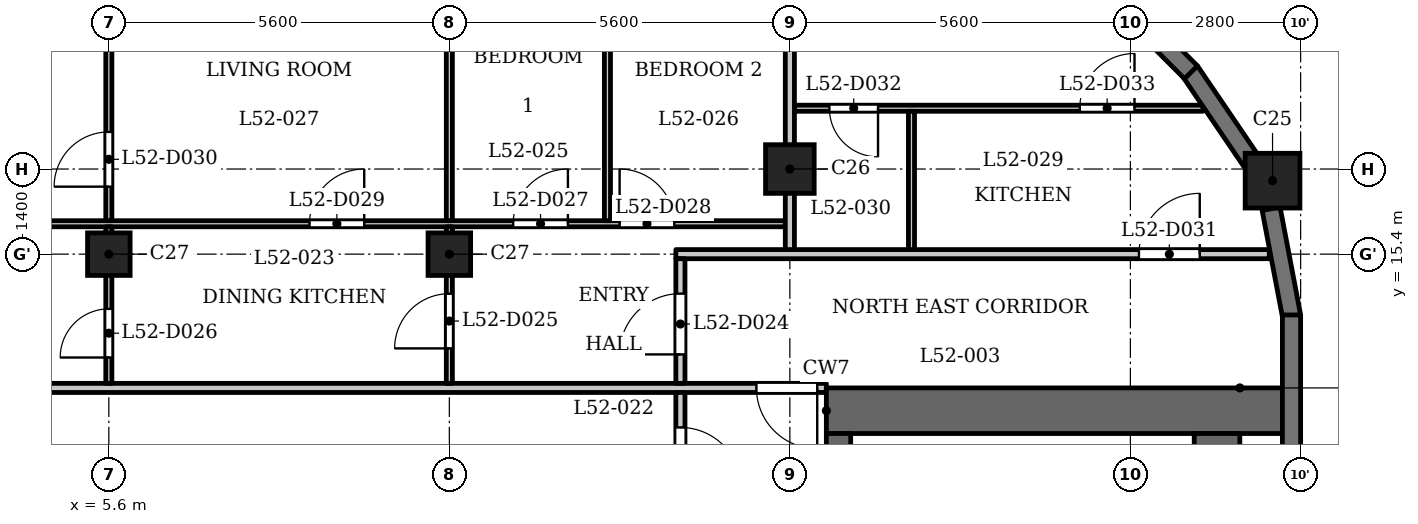
"""IFC4 building model, lengths in metres.
Left out: names, types, materials, properties, quantities, classifications, styles, units other than length and angle.
Written with IfcOpenShell. Run it as: python <this file> out.ifc"""

import sys

from ifc_helpers import new_model, si_unit, direction, frame, frame_2d, origin, origin_2d, place, context, subcontext, project, spatial, rectangle, extrude, element, fill, save


model = new_model("IFC4")
c1 = context("Model", 3, precision=1e-05, world=origin(), true_north=direction((0.0, 1.0)))
c2 = subcontext(c1, "Body", "Model", "MODEL_VIEW")
j1 = project(units=[si_unit("LENGTHUNIT", "METRE"), si_unit("PLANEANGLEUNIT", "RADIAN")], contexts=[c1])
p1 = place(None, origin())
s1 = spatial("IfcSite", under=j1, at=p1, CompositionType="ELEMENT")
p2 = place(p1, origin())
s2 = spatial("IfcBuilding", under=s1, at=p2, CompositionType="ELEMENT")
p3 = place(p2, frame((0.0, 0.0, 202.9)))
s3 = spatial("IfcBuildingStorey", under=s2, at=p3, CompositionType="ELEMENT", Elevation=202.9)
p4 = place(p3, frame((24.738, 16.609, 0.0), z_axis=(0.0, 0.0, 1.0), x_axis=(1.0, 0.0, 0.0)))
e1 = element("IfcColumn", 1, at=p4, inside=s3, PredefinedType="COLUMN", context=c2, shape_type="SweptSolid", body=[
    extrude(rectangle(XDim=0.9, YDim=0.9, at=origin_2d()), origin(), (0.0, 0.0, 1.0), 3.5),
])
p5 = place(p3, frame((16.8, 16.8, 0.0), z_axis=(0.0, 0.0, 1.0), x_axis=(1.0, 0.0, 0.0)))
e2 = element("IfcColumn", 2, at=p5, inside=s3, PredefinedType="COLUMN", context=c2, shape_type="SweptSolid", body=[
    extrude(rectangle(XDim=0.8, YDim=0.8, at=origin_2d()), origin(), (0.0, 0.0, 1.0), 3.5),
])
for number, where, z_axis, x_axis in (
    (3, (5.6, 15.4, 0.0), (0.0, 0.0, 1.0), (1.0, 0.0, 0.0)),
    (4, (11.2, 15.4, 0.0), (0.0, 0.0, 1.0), (1.0, 0.0, 0.0)),
):
    element("IfcColumn", number, at=place(p3, frame(where, z_axis=z_axis, x_axis=x_axis)), inside=s3, PredefinedType="COLUMN", context=c2, shape_type="SweptSolid", body=[
        extrude(rectangle(XDim=0.7, YDim=0.7, at=origin_2d()), origin(), (0.0, 0.0, 1.0), 3.5),
    ])
p6 = place(p3, frame((25.05, 11.65, 0.0), z_axis=(0.0, 0.0, 1.0), x_axis=(0.0, 1.0, 0.0)))
e5 = element("IfcWall", 5, at=p6, inside=s3, PredefinedType="SOLIDWALL", context=c2, shape_type="SweptSolid", body=[
    extrude(rectangle(XDim=2.75, YDim=0.3, at=frame_2d((1.375, 0.0))), origin(), (0.0, 0.0, 1.0), 2.5),
])
for number, where, z_axis, x_axis in (
    (6, (25.053, 14.372, 0.0), (0.0, 0.0, 1.0), (-0.187, 0.982, 0.0)),
    (7, (24.394, 16.919, 0.0), (0.0, 0.0, 1.0), (-0.562, 0.827, 0.0)),
):
    element("IfcWall", number, at=place(p3, frame(where, z_axis=z_axis, x_axis=x_axis)), inside=s3, PredefinedType="SOLIDWALL", context=c2, shape_type="SweptSolid", body=[
        extrude(rectangle(XDim=1.806, YDim=0.3, at=frame_2d((0.903, 0.0))), origin(), (0.0, 0.0, 1.0), 2.5),
    ])
p7 = place(p3, frame((23.397, 18.391, 0.0), z_axis=(0.0, 0.0, 1.0), x_axis=(-0.707106781187, 0.707106781187, 0.0)))
e8 = element("IfcWall", 8, at=p7, inside=s3, PredefinedType="SOLIDWALL", context=c2, shape_type="SweptSolid", body=[
    extrude(rectangle(XDim=2.75, YDim=0.3, at=frame_2d((1.375, 0.0))), origin(), (0.0, 0.0, 1.0), 2.5),
])
p8 = place(p7, frame((0.775, 0.0, 0.6)))
e9 = element("IfcOpeningElement", 9, at=p8, cuts=e8, PredefinedType="OPENING", context=c2, shape_type="SweptSolid", body=[
    extrude(rectangle(XDim=1.2, YDim=1.55, at=frame_2d((0.6, 0.775))), frame((0.0, 0.16, 0.0), z_axis=(0.0, -1.0, 0.0), x_axis=(1.0, 0.0, 0.0)), (0.0, 0.0, 1.0), 0.32),
])
p9 = place(p3, frame((17.4, 12.825, 0.0), z_axis=(0.0, 0.0, 1.0), x_axis=(1.0, 0.0, 0.0)))
e10 = element("IfcWall", 10, at=p9, inside=s3, PredefinedType="SHEAR", context=c2, shape_type="SweptSolid", body=[
    extrude(rectangle(XDim=7.6, YDim=0.75, at=frame_2d((3.8, 0.0))), origin(), (0.0, 0.0, 1.0), 3.2),
])
p10 = place(p3, frame((17.6, -12.45, 0.0), z_axis=(0.0, 0.0, 1.0), x_axis=(0.0, 1.0, 0.0)))
e11 = element("IfcWall", 11, at=p10, inside=s3, PredefinedType="SHEAR", context=c2, shape_type="SweptSolid", body=[
    extrude(rectangle(XDim=24.9, YDim=0.4, at=frame_2d((12.45, 0.0))), origin(), (0.0, 0.0, 1.0), 3.2),
])
p11 = place(p10, frame((8.65, 0.0, 0.0)))
e12 = element("IfcOpeningElement", 12, at=p11, cuts=e11, PredefinedType="OPENING", context=c2, shape_type="SweptSolid", body=[
    extrude(rectangle(XDim=0.9, YDim=2.1, at=frame_2d((0.45, 1.05))), frame((0.0, 0.21, 0.0), z_axis=(0.0, -1.0, 0.0), x_axis=(1.0, 0.0, 0.0)), (0.0, 0.0, 1.0), 0.42),
])
p12 = place(p10, frame((15.6, 0.0, 0.0)))
e13 = element("IfcOpeningElement", 13, at=p12, cuts=e11, PredefinedType="OPENING", context=c2, shape_type="SweptSolid", body=[
    extrude(rectangle(XDim=1.1, YDim=2.1, at=frame_2d((0.55, 1.05))), frame((0.0, 0.21, 0.0), z_axis=(0.0, -1.0, 0.0), x_axis=(1.0, 0.0, 0.0)), (0.0, 0.0, 1.0), 0.42),
])
p13 = place(p10, frame((18.0, 0.0, 0.0)))
e14 = element("IfcOpeningElement", 14, at=p13, cuts=e11, PredefinedType="OPENING", context=c2, shape_type="SweptSolid", body=[
    extrude(rectangle(XDim=1.1, YDim=2.1, at=frame_2d((0.55, 1.05))), frame((0.0, 0.21, 0.0), z_axis=(0.0, -1.0, 0.0), x_axis=(1.0, 0.0, 0.0)), (0.0, 0.0, 1.0), 0.42),
])
p14 = place(p10, frame((23.025, 0.0, 0.0)))
e15 = element("IfcOpeningElement", 15, at=p14, cuts=e11, PredefinedType="OPENING", context=c2, shape_type="SweptSolid", body=[
    extrude(rectangle(XDim=1.1, YDim=2.1, at=frame_2d((0.55, 1.05))), frame((0.0, 0.21, 0.0), z_axis=(0.0, -1.0, 0.0), x_axis=(1.0, 0.0, 0.0)), (0.0, 0.0, 1.0), 0.42),
])
p15 = place(p10, frame((0.775, 0.0, 0.0)))
e16 = element("IfcOpeningElement", 16, at=p15, cuts=e11, PredefinedType="OPENING", context=c2, shape_type="SweptSolid", body=[
    extrude(rectangle(XDim=1.1, YDim=2.1, at=frame_2d((0.55, 1.05))), frame((0.0, 0.21, 0.0), z_axis=(0.0, -1.0, 0.0), x_axis=(1.0, 0.0, 0.0)), (0.0, 0.0, 1.0), 0.42),
])
p16 = place(p10, frame((12.925, 0.0, 0.0)))
e17 = element("IfcOpeningElement", 17, at=p16, cuts=e11, PredefinedType="OPENING", context=c2, shape_type="SweptSolid", body=[
    extrude(rectangle(XDim=1.8, YDim=2.1, at=frame_2d((0.9, 1.05))), frame((0.0, 0.21, 0.0), z_axis=(0.0, -1.0, 0.0), x_axis=(1.0, 0.0, 0.0)), (0.0, 0.0, 1.0), 0.42),
])
p17 = place(p3, frame((23.825, -12.45, 0.0), z_axis=(0.0, 0.0, 1.0), x_axis=(0.0, 1.0, 0.0)))
e18 = element("IfcWall", 18, at=p17, inside=s3, PredefinedType="SHEAR", context=c2, shape_type="SweptSolid", body=[
    extrude(rectangle(XDim=24.9, YDim=0.75, at=frame_2d((12.45, 0.0))), origin(), (0.0, 0.0, 1.0), 3.2),
])
p18 = place(p3, frame((-17.4, 13.2, 0.0), z_axis=(0.0, 0.0, 1.0), x_axis=(1.0, 0.0, 0.0)))
e19 = element("IfcWall", 19, at=p18, inside=s3, PredefinedType="PARTITIONING", context=c2, shape_type="SweptSolid", body=[
    extrude(rectangle(XDim=34.8, YDim=0.15, at=frame_2d((17.4, 0.0))), origin(), (0.0, 0.0, 1.0), 3.2),
])
p19 = place(p18, frame((0.25, 0.0, 0.0)))
e20 = element("IfcOpeningElement", 20, at=p19, cuts=e19, PredefinedType="OPENING", context=c2, shape_type="SweptSolid", body=[
    extrude(rectangle(XDim=1.0, YDim=2.1, at=frame_2d((0.5, 1.05))), frame((0.0, 0.085, 0.0), z_axis=(0.0, -1.0, 0.0), x_axis=(1.0, 0.0, 0.0)), (0.0, 0.0, 1.0), 0.17),
])
p20 = place(p18, frame((33.65, 0.0, 0.0)))
e21 = element("IfcOpeningElement", 21, at=p20, cuts=e19, PredefinedType="OPENING", context=c2, shape_type="SweptSolid", body=[
    extrude(rectangle(XDim=1.0, YDim=2.1, at=frame_2d((0.5, 1.05))), frame((0.0, 0.085, 0.0), z_axis=(0.0, -1.0, 0.0), x_axis=(1.0, 0.0, 0.0)), (0.0, 0.0, 1.0), 0.17),
])
p21 = place(p3, frame((14.925, 15.4, 0.0), z_axis=(0.0, 0.0, 1.0), x_axis=(1.0, 0.0, 0.0)))
e22 = element("IfcWall", 22, at=p21, inside=s3, PredefinedType="PARTITIONING", context=c2, shape_type="SweptSolid", body=[
    extrude(rectangle(XDim=9.759, YDim=0.15, at=frame_2d((4.879, 0.0))), origin(), (0.0, 0.0, 1.0), 3.2),
])
p22 = place(p21, frame((7.616, 0.0, 0.0)))
e23 = element("IfcOpeningElement", 23, at=p22, cuts=e22, PredefinedType="OPENING", context=c2, shape_type="SweptSolid", body=[
    extrude(rectangle(XDim=1.0, YDim=2.1, at=frame_2d((0.5, 1.05))), frame((0.0, 0.085, 0.0), z_axis=(0.0, -1.0, 0.0), x_axis=(1.0, 0.0, 0.0)), (0.0, 0.0, 1.0), 0.17),
])
p23 = place(p3, frame((-16.725, 15.9, 0.0), z_axis=(0.0, 0.0, 1.0), x_axis=(1.0, 0.0, 0.0)))
e24 = element("IfcWall", 24, at=p23, inside=s3, PredefinedType="PARTITIONING", context=c2, shape_type="SweptSolid", body=[
    extrude(rectangle(XDim=33.45, YDim=0.1, at=frame_2d((16.725, 0.0))), origin(), (0.0, 0.0, 1.0), 3.2),
])
p24 = place(p23, frame((1.875, 0.0, 0.0)))
e25 = element("IfcOpeningElement", 25, at=p24, cuts=e24, PredefinedType="OPENING", context=c2, shape_type="SweptSolid", body=[
    extrude(rectangle(XDim=0.9, YDim=2.1, at=frame_2d((0.45, 1.05))), frame((0.0, 0.06, 0.0), z_axis=(0.0, -1.0, 0.0), x_axis=(1.0, 0.0, 0.0)), (0.0, 0.0, 1.0), 0.12),
])
p25 = place(p23, frame((3.975, 0.0, 0.0)))
e26 = element("IfcOpeningElement", 26, at=p25, cuts=e24, PredefinedType="OPENING", context=c2, shape_type="SweptSolid", body=[
    extrude(rectangle(XDim=0.9, YDim=2.1, at=frame_2d((0.45, 1.05))), frame((0.0, 0.06, 0.0), z_axis=(0.0, -1.0, 0.0), x_axis=(1.0, 0.0, 0.0)), (0.0, 0.0, 1.0), 0.12),
])
p26 = place(p23, frame((6.825, 0.0, 0.0)))
e27 = element("IfcOpeningElement", 27, at=p26, cuts=e24, PredefinedType="OPENING", context=c2, shape_type="SweptSolid", body=[
    extrude(rectangle(XDim=0.9, YDim=2.1, at=frame_2d((0.45, 1.05))), frame((0.0, 0.06, 0.0), z_axis=(0.0, -1.0, 0.0), x_axis=(1.0, 0.0, 0.0)), (0.0, 0.0, 1.0), 0.12),
])
p27 = place(p23, frame((28.975, 0.0, 0.0)))
e28 = element("IfcOpeningElement", 28, at=p27, cuts=e24, PredefinedType="OPENING", context=c2, shape_type="SweptSolid", body=[
    extrude(rectangle(XDim=0.9, YDim=2.1, at=frame_2d((0.45, 1.05))), frame((0.0, 0.06, 0.0), z_axis=(0.0, -1.0, 0.0), x_axis=(1.0, 0.0, 0.0)), (0.0, 0.0, 1.0), 0.12),
])
p28 = place(p23, frame((30.725, 0.0, 0.0)))
e29 = element("IfcOpeningElement", 29, at=p28, cuts=e24, PredefinedType="OPENING", context=c2, shape_type="SweptSolid", body=[
    extrude(rectangle(XDim=0.9, YDim=2.1, at=frame_2d((0.45, 1.05))), frame((0.0, 0.06, 0.0), z_axis=(0.0, -1.0, 0.0), x_axis=(1.0, 0.0, 0.0)), (0.0, 0.0, 1.0), 0.12),
])
p29 = place(p23, frame((25.625, 0.0, 0.0)))
e30 = element("IfcOpeningElement", 30, at=p29, cuts=e24, PredefinedType="OPENING", context=c2, shape_type="SweptSolid", body=[
    extrude(rectangle(XDim=0.9, YDim=2.1, at=frame_2d((0.45, 1.05))), frame((0.0, 0.06, 0.0), z_axis=(0.0, -1.0, 0.0), x_axis=(1.0, 0.0, 0.0)), (0.0, 0.0, 1.0), 0.12),
])
p30 = place(p3, frame((16.875, 17.8, 0.0), z_axis=(0.0, 0.0, 1.0), x_axis=(1.0, 0.0, 0.0)))
e31 = element("IfcWall", 31, at=p30, inside=s3, PredefinedType="PARTITIONING", context=c2, shape_type="SweptSolid", body=[
    extrude(rectangle(XDim=6.719, YDim=0.1, at=frame_2d((3.359, 0.0))), origin(), (0.0, 0.0, 1.0), 3.2),
])
p31 = place(p30, frame((0.575, 0.0, 0.0)))
e32 = element("IfcOpeningElement", 32, at=p31, cuts=e31, PredefinedType="OPENING", context=c2, shape_type="SweptSolid", body=[
    extrude(rectangle(XDim=0.8, YDim=2.1, at=frame_2d((0.4, 1.05))), frame((0.0, 0.06, 0.0), z_axis=(0.0, -1.0, 0.0), x_axis=(1.0, 0.0, 0.0)), (0.0, 0.0, 1.0), 0.12),
])
p32 = place(p30, frame((4.693, 0.0, 0.0)))
e33 = element("IfcOpeningElement", 33, at=p32, cuts=e31, PredefinedType="OPENING", context=c2, shape_type="SweptSolid", body=[
    extrude(rectangle(XDim=0.9, YDim=2.1, at=frame_2d((0.45, 1.05))), frame((0.0, 0.06, 0.0), z_axis=(0.0, -1.0, 0.0), x_axis=(1.0, 0.0, 0.0)), (0.0, 0.0, 1.0), 0.12),
])
p33 = place(p3, frame((5.6, 13.275, 0.0), z_axis=(0.0, 0.0, 1.0), x_axis=(0.0, 1.0, 0.0)))
e34 = element("IfcWall", 34, at=p33, inside=s3, PredefinedType="PARTITIONING", context=c2, shape_type="SweptSolid", body=[
    extrude(rectangle(XDim=2.575, YDim=0.1, at=frame_2d((1.288, 0.0))), origin(), (0.0, 0.0, 1.0), 3.2),
])
p34 = place(p33, frame((0.425, 0.0, 0.0)))
e35 = element("IfcOpeningElement", 35, at=p34, cuts=e34, PredefinedType="OPENING", context=c2, shape_type="SweptSolid", body=[
    extrude(rectangle(XDim=0.8, YDim=2.1, at=frame_2d((0.4, 1.05))), frame((0.0, 0.06, 0.0), z_axis=(0.0, -1.0, 0.0), x_axis=(1.0, 0.0, 0.0)), (0.0, 0.0, 1.0), 0.12),
])
p35 = place(p3, frame((5.6, 15.95, 0.0), z_axis=(0.0, 0.0, 1.0), x_axis=(0.0, 1.0, 0.0)))
e36 = element("IfcWall", 36, at=p35, inside=s3, PredefinedType="PARTITIONING", context=c2, shape_type="SweptSolid", body=[
    extrude(rectangle(XDim=6.13, YDim=0.1, at=frame_2d((3.065, 0.0))), origin(), (0.0, 0.0, 1.0), 3.2),
])
p36 = place(p35, frame((0.56, 0.0, 0.0)))
e37 = element("IfcOpeningElement", 37, at=p36, cuts=e36, PredefinedType="OPENING", context=c2, shape_type="SweptSolid", body=[
    extrude(rectangle(XDim=0.9, YDim=2.1, at=frame_2d((0.45, 1.05))), frame((0.0, 0.06, 0.0), z_axis=(0.0, -1.0, 0.0), x_axis=(1.0, 0.0, 0.0)), (0.0, 0.0, 1.0), 0.12),
])
p37 = place(p3, frame((11.2, 13.275, 0.0), z_axis=(0.0, 0.0, 1.0), x_axis=(0.0, 1.0, 0.0)))
e38 = element("IfcWall", 38, at=p37, inside=s3, PredefinedType="PARTITIONING", context=c2, shape_type="SweptSolid", body=[
    extrude(rectangle(XDim=2.575, YDim=0.1, at=frame_2d((1.288, 0.0))), origin(), (0.0, 0.0, 1.0), 3.2),
])
p38 = place(p37, frame((0.575, 0.0, 0.0)))
e39 = element("IfcOpeningElement", 39, at=p38, cuts=e38, PredefinedType="OPENING", context=c2, shape_type="SweptSolid", body=[
    extrude(rectangle(XDim=0.9, YDim=2.1, at=frame_2d((0.45, 1.05))), frame((0.0, 0.06, 0.0), z_axis=(0.0, -1.0, 0.0), x_axis=(1.0, 0.0, 0.0)), (0.0, 0.0, 1.0), 0.12),
])
p39 = place(p3, frame((11.2, 15.95, 0.0), z_axis=(0.0, 0.0, 1.0), x_axis=(0.0, 1.0, 0.0)))
e40 = element("IfcWall", 40, at=p39, inside=s3, PredefinedType="PARTITIONING", context=c2, shape_type="SweptSolid", body=[
    extrude(rectangle(XDim=6.13, YDim=0.1, at=frame_2d((3.065, 0.0))), origin(), (0.0, 0.0, 1.0), 3.2),
])
p40 = place(p3, frame((13.8, 15.95, 0.0), z_axis=(0.0, 0.0, 1.0), x_axis=(0.0, 1.0, 0.0)))
e41 = element("IfcWall", 41, at=p40, inside=s3, PredefinedType="PARTITIONING", context=c2, shape_type="SweptSolid", body=[
    extrude(rectangle(XDim=6.88, YDim=0.1, at=frame_2d((3.44, 0.0))), origin(), (0.0, 0.0, 1.0), 3.2),
])
p41 = place(p3, frame((15.0, 6.769, 0.0), z_axis=(0.0, 0.0, 1.0), x_axis=(0.0, 1.0, 0.0)))
e42 = element("IfcWall", 42, at=p41, inside=s3, PredefinedType="PARTITIONING", context=c2, shape_type="SweptSolid", body=[
    extrude(rectangle(XDim=6.356, YDim=0.15, at=frame_2d((3.178, 0.0))), origin(), (0.0, 0.0, 1.0), 3.2),
])
p42 = place(p41, frame((4.781, 0.0, 0.0)))
e43 = element("IfcOpeningElement", 43, at=p42, cuts=e42, PredefinedType="OPENING", context=c2, shape_type="SweptSolid", body=[
    extrude(rectangle(XDim=1.0, YDim=2.1, at=frame_2d((0.5, 1.05))), frame((0.0, 0.085, 0.0), z_axis=(0.0, -1.0, 0.0), x_axis=(1.0, 0.0, 0.0)), (0.0, 0.0, 1.0), 0.17),
])
p43 = place(p3, frame((15.0, 13.275, 0.0), z_axis=(0.0, 0.0, 1.0), x_axis=(0.0, 1.0, 0.0)))
e44 = element("IfcWall", 44, at=p43, inside=s3, PredefinedType="PARTITIONING", context=c2, shape_type="SweptSolid", body=[
    extrude(rectangle(XDim=2.05, YDim=0.15, at=frame_2d((1.025, 0.0))), origin(), (0.0, 0.0, 1.0), 3.2),
])
p44 = place(p43, frame((0.476, 0.0, 0.0)))
e45 = element("IfcOpeningElement", 45, at=p44, cuts=e44, PredefinedType="OPENING", context=c2, shape_type="SweptSolid", body=[
    extrude(rectangle(XDim=1.0, YDim=2.1, at=frame_2d((0.5, 1.05))), frame((0.0, 0.085, 0.0), z_axis=(0.0, -1.0, 0.0), x_axis=(1.0, 0.0, 0.0)), (0.0, 0.0, 1.0), 0.17),
])
p45 = place(p3, frame((16.8, 15.475, 0.0), z_axis=(0.0, 0.0, 1.0), x_axis=(0.0, 1.0, 0.0)))
e46 = element("IfcWall", 46, at=p45, inside=s3, PredefinedType="PARTITIONING", context=c2, shape_type="SweptSolid", body=[
    extrude(rectangle(XDim=6.835, YDim=0.15, at=frame_2d((3.417, 0.0))), origin(), (0.0, 0.0, 1.0), 2.55),
])
p46 = place(p3, frame((18.8, 15.475, 0.0), z_axis=(0.0, 0.0, 1.0), x_axis=(0.0, 1.0, 0.0)))
e47 = element("IfcWall", 47, at=p46, inside=s3, PredefinedType="PARTITIONING", context=c2, shape_type="SweptSolid", body=[
    extrude(rectangle(XDim=2.275, YDim=0.1, at=frame_2d((1.137, 0.0))), origin(), (0.0, 0.0, 1.0), 3.2),
])
p47 = place(p42, origin())
e48 = element("IfcDoor", 48, at=p47, inside=s3, OperationType="SINGLE_SWING_LEFT", PredefinedType="DOOR", context=c2, shape_type="SweptSolid", body=[
    extrude(rectangle(XDim=1.0, YDim=2.1, at=frame_2d((0.5, 1.05))), frame((0.0, 0.025, 0.0), z_axis=(0.0, -1.0, 0.0), x_axis=(1.0, 0.0, 0.0)), (0.0, 0.0, 1.0), 0.05),
])
fill(e43, e48)
p48 = place(p20, origin())
e49 = element("IfcDoor", 49, at=p48, inside=s3, OperationType="SINGLE_SWING_RIGHT", PredefinedType="DOOR", context=c2, shape_type="SweptSolid", body=[
    extrude(rectangle(XDim=1.0, YDim=2.1, at=frame_2d((0.5, 1.05))), frame((0.0, 0.025, 0.0), z_axis=(0.0, -1.0, 0.0), x_axis=(1.0, 0.0, 0.0)), (0.0, 0.0, 1.0), 0.05),
])
fill(e21, e49)
p49 = place(p44, origin())
e50 = element("IfcDoor", 50, at=p49, inside=s3, OperationType="SINGLE_SWING_RIGHT", PredefinedType="DOOR", context=c2, shape_type="SweptSolid", body=[
    extrude(rectangle(XDim=1.0, YDim=2.1, at=frame_2d((0.5, 1.05))), frame((0.0, 0.025, 0.0), z_axis=(0.0, -1.0, 0.0), x_axis=(1.0, 0.0, 0.0)), (0.0, 0.0, 1.0), 0.05),
])
fill(e45, e50)
p50 = place(p38, origin())
e51 = element("IfcDoor", 51, at=p50, inside=s3, OperationType="SINGLE_SWING_RIGHT", PredefinedType="DOOR", context=c2, shape_type="SweptSolid", body=[
    extrude(rectangle(XDim=0.9, YDim=2.1, at=frame_2d((0.45, 1.05))), frame((0.0, 0.025, 0.0), z_axis=(0.0, -1.0, 0.0), x_axis=(1.0, 0.0, 0.0)), (0.0, 0.0, 1.0), 0.05),
])
fill(e39, e51)
p51 = place(p34, origin())
e52 = element("IfcDoor", 52, at=p51, inside=s3, OperationType="SINGLE_SWING_RIGHT", PredefinedType="DOOR", context=c2, shape_type="SweptSolid", body=[
    extrude(rectangle(XDim=0.8, YDim=2.1, at=frame_2d((0.4, 1.05))), frame((0.0, 0.025, 0.0), z_axis=(0.0, -1.0, 0.0), x_axis=(1.0, 0.0, 0.0)), (0.0, 0.0, 1.0), 0.05),
])
fill(e35, e52)
p52 = place(p27, origin())
e53 = element("IfcDoor", 53, at=p52, inside=s3, OperationType="SINGLE_SWING_LEFT", PredefinedType="DOOR", context=c2, shape_type="SweptSolid", body=[
    extrude(rectangle(XDim=0.9, YDim=2.1, at=frame_2d((0.45, 1.05))), frame((0.0, 0.025, 0.0), z_axis=(0.0, -1.0, 0.0), x_axis=(1.0, 0.0, 0.0)), (0.0, 0.0, 1.0), 0.05),
])
fill(e28, e53)
p53 = place(p28, origin())
e54 = element("IfcDoor", 54, at=p53, inside=s3, OperationType="SINGLE_SWING_RIGHT", PredefinedType="DOOR", context=c2, shape_type="SweptSolid", body=[
    extrude(rectangle(XDim=0.9, YDim=2.1, at=frame_2d((0.45, 1.05))), frame((0.0, 0.025, 0.0), z_axis=(0.0, -1.0, 0.0), x_axis=(1.0, 0.0, 0.0)), (0.0, 0.0, 1.0), 0.05),
])
fill(e29, e54)
p54 = place(p29, origin())
e55 = element("IfcDoor", 55, at=p54, inside=s3, OperationType="SINGLE_SWING_LEFT", PredefinedType="DOOR", context=c2, shape_type="SweptSolid", body=[
    extrude(rectangle(XDim=0.9, YDim=2.1, at=frame_2d((0.45, 1.05))), frame((0.0, 0.025, 0.0), z_axis=(0.0, -1.0, 0.0), x_axis=(1.0, 0.0, 0.0)), (0.0, 0.0, 1.0), 0.05),
])
fill(e30, e55)
p55 = place(p36, origin())
e56 = element("IfcDoor", 56, at=p55, inside=s3, OperationType="SINGLE_SWING_RIGHT", PredefinedType="DOOR", context=c2, shape_type="SweptSolid", body=[
    extrude(rectangle(XDim=0.9, YDim=2.1, at=frame_2d((0.45, 1.05))), frame((0.0, 0.025, 0.0), z_axis=(0.0, -1.0, 0.0), x_axis=(1.0, 0.0, 0.0)), (0.0, 0.0, 1.0), 0.05),
])
fill(e37, e56)
p56 = place(p22, origin())
e57 = element("IfcDoor", 57, at=p56, inside=s3, OperationType="SINGLE_SWING_LEFT", PredefinedType="DOOR", context=c2, shape_type="SweptSolid", body=[
    extrude(rectangle(XDim=1.0, YDim=2.1, at=frame_2d((0.5, 1.05))), frame((0.0, 0.025, 0.0), z_axis=(0.0, -1.0, 0.0), x_axis=(1.0, 0.0, 0.0)), (0.0, 0.0, 1.0), 0.05),
])
fill(e23, e57)
p57 = place(p31, origin())
e58 = element("IfcDoor", 58, at=p57, inside=s3, OperationType="SINGLE_SWING_RIGHT", PredefinedType="DOOR", context=c2, shape_type="SweptSolid", body=[
    extrude(rectangle(XDim=0.8, YDim=2.1, at=frame_2d((0.4, 1.05))), frame((0.0, 0.025, 0.0), z_axis=(0.0, -1.0, 0.0), x_axis=(1.0, 0.0, 0.0)), (0.0, 0.0, 1.0), 0.05),
])
fill(e32, e58)
p58 = place(p32, origin())
e59 = element("IfcDoor", 59, at=p58, inside=s3, OperationType="SINGLE_SWING_LEFT", PredefinedType="DOOR", context=c2, shape_type="SweptSolid", body=[
    extrude(rectangle(XDim=0.9, YDim=2.1, at=frame_2d((0.45, 1.05))), frame((0.0, 0.025, 0.0), z_axis=(0.0, -1.0, 0.0), x_axis=(1.0, 0.0, 0.0)), (0.0, 0.0, 1.0), 0.05),
])
fill(e33, e59)
save(model, sys.argv[1])
